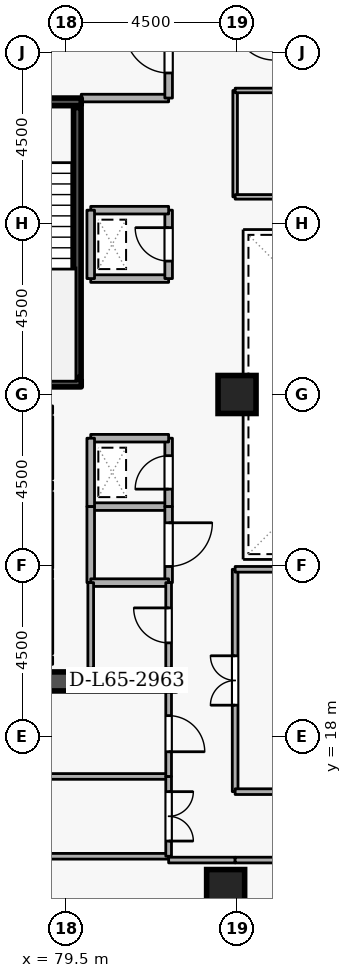
"""IFC4 building model, lengths in metres.
Left out: names, types, materials, properties, quantities, classifications, styles, units other than length and angle.
Written with IfcOpenShell. Run it as: python <this file> out.ifc"""

import sys

from ifc_helpers import new_model, si_unit, direction, frame, frame_2d, origin, origin_2d, place, context, subcontext, project, spatial, rectangle, extrude, element, fill, save


model = new_model("IFC4")
c1 = context("Model", 3, precision=1e-05, world=origin(), true_north=direction((0.0, 1.0)))
c2 = subcontext(c1, "Body", "Model", "MODEL_VIEW")
j1 = project(units=[si_unit("LENGTHUNIT", "METRE"), si_unit("PLANEANGLEUNIT", "RADIAN")], contexts=[c1])
p1 = place(None, origin())
s1 = spatial("IfcSite", under=j1, at=p1, CompositionType="ELEMENT")
p2 = place(p1, origin())
s2 = spatial("IfcBuilding", under=s1, at=p2, CompositionType="ELEMENT")
p3 = place(p2, frame((0.0, 0.0, 243.9)))
s3 = spatial("IfcBuildingStorey", under=s2, at=p3, CompositionType="ELEMENT", Elevation=243.9)
p4 = place(p3, frame((76.6, 19.45, 0.0), z_axis=(0.0, 0.0, 1.0), x_axis=(1.0, 0.0, 0.0)))
e1 = element("IfcWall", 1, at=p4, inside=s3, PredefinedType="SHEAR", context=c2, shape_type="SweptSolid", body=[
    extrude(rectangle(XDim=5.8, YDim=0.5, at=frame_2d((2.9, 0.0))), origin(), (0.0, 0.0, 1.0), 3.6),
])
for number, where, z_axis, x_axis in (
    (2, (83.7, 14.0, 0.0), (0.0, 0.0, 1.0), (1.0, 0.0, 0.0)),
    (3, (84.0, 27.0, 0.0), (0.0, 0.0, 1.0), (1.0, 0.0, 0.0)),
):
    element("IfcColumn", number, at=place(p3, frame(where, z_axis=z_axis, x_axis=x_axis)), inside=s3, PredefinedType="COLUMN", context=c2, shape_type="SweptSolid", body=[
        extrude(rectangle(XDim=1.0, YDim=1.0, at=origin_2d()), origin(), (0.0, 0.0, 1.0), 3.6),
    ])
p5 = place(p3, frame((79.05, 24.78, 0.0), z_axis=(0.0, 0.0, 1.0), x_axis=(0.0, 1.0, 0.0)))
e4 = element("IfcWall", 4, at=p5, inside=s3, PredefinedType="STANDARD", context=c2, shape_type="SweptSolid", body=[
    extrude(rectangle(XDim=1.64, YDim=0.2, at=frame_2d((0.82, 0.0))), origin(), (0.0, 0.0, 1.0), 3.34),
])
p6 = place(p5, frame((0.31, 0.0, 0.0)))
e5 = element("IfcOpeningElement", 5, at=p6, cuts=e4, PredefinedType="OPENING", context=c2, shape_type="SweptSolid", body=[
    extrude(rectangle(XDim=1.02, YDim=2.06, at=frame_2d((0.51, 1.03))), frame((0.0, 0.11, 0.0), z_axis=(0.0, -1.0, 0.0), x_axis=(1.0, 0.0, 0.0)), (0.0, 0.0, 1.0), 0.22),
])
p7 = place(p3, frame((79.05, 22.43, 0.0), z_axis=(0.0, 0.0, 1.0), x_axis=(0.0, 1.0, 0.0)))
e6 = element("IfcWall", 6, at=p7, inside=s3, PredefinedType="STANDARD", context=c2, shape_type="SweptSolid", body=[
    extrude(rectangle(XDim=1.99, YDim=0.2, at=frame_2d((0.995, 0.0))), origin(), (0.0, 0.0, 1.0), 3.34),
])
p8 = place(p7, frame((0.485, 0.0, 0.0)))
e7 = element("IfcOpeningElement", 7, at=p8, cuts=e6, PredefinedType="OPENING", context=c2, shape_type="SweptSolid", body=[
    extrude(rectangle(XDim=1.02, YDim=2.06, at=frame_2d((0.51, 1.03))), frame((0.0, 0.11, 0.0), z_axis=(0.0, -1.0, 0.0), x_axis=(1.0, 0.0, 0.0)), (0.0, 0.0, 1.0), 0.22),
])
p9 = place(p3, frame((79.05, 20.18, 0.0), z_axis=(0.0, 0.0, 1.0), x_axis=(0.0, 1.0, 0.0)))
e8 = element("IfcWall", 8, at=p9, inside=s3, PredefinedType="STANDARD", context=c2, shape_type="SweptSolid", body=[
    extrude(rectangle(XDim=1.94, YDim=0.2, at=frame_2d((0.97, 0.0))), origin(), (0.0, 0.0, 1.0), 3.34),
])
p10 = place(p9, frame((0.46, 0.0, 0.0)))
e9 = element("IfcOpeningElement", 9, at=p10, cuts=e8, PredefinedType="OPENING", context=c2, shape_type="SweptSolid", body=[
    extrude(rectangle(XDim=1.02, YDim=2.06, at=frame_2d((0.51, 1.03))), frame((0.0, 0.11, 0.0), z_axis=(0.0, -1.0, 0.0), x_axis=(1.0, 0.0, 0.0)), (0.0, 0.0, 1.0), 0.22),
])
p11 = place(p3, frame((76.55, 34.7, 0.0), z_axis=(0.0, 0.0, 1.0), x_axis=(1.0, 0.0, 0.0)))
e10 = element("IfcWall", 10, at=p11, inside=s3, PredefinedType="SHEAR", context=c2, shape_type="SweptSolid", body=[
    extrude(rectangle(XDim=3.35, YDim=0.2, at=frame_2d((1.675, 0.0))), origin(), (0.0, 0.0, 1.0), 3.6),
])
p12 = place(p11, frame((1.125, 0.0, 0.0)))
e11 = element("IfcOpeningElement", 11, at=p12, cuts=e10, PredefinedType="OPENING", context=c2, shape_type="SweptSolid", body=[
    extrude(rectangle(XDim=1.1, YDim=2.1, at=frame_2d((0.55, 1.05))), frame((0.0, 0.11, 0.0), z_axis=(0.0, -1.0, 0.0), x_axis=(1.0, 0.0, 0.0)), (0.0, 0.0, 1.0), 0.22),
])
p13 = place(p3, frame((79.9, 27.3, 0.0), z_axis=(0.0, 0.0, 1.0), x_axis=(-1.0, 0.0, 0.0)))
e12 = element("IfcWall", 12, at=p13, inside=s3, PredefinedType="SHEAR", context=c2, shape_type="SweptSolid", body=[
    extrude(rectangle(XDim=3.35, YDim=0.2, at=frame_2d((1.675, 0.0))), origin(), (0.0, 0.0, 1.0), 3.6),
])
p14 = place(p3, frame((79.797, 27.45, 0.0), z_axis=(0.0, 0.0, 1.0), x_axis=(0.0, 1.0, 0.0)))
e13 = element("IfcWall", 13, at=p14, inside=s3, PredefinedType="SHEAR", context=c2, shape_type="SweptSolid", body=[
    extrude(rectangle(XDim=7.1, YDim=0.2, at=frame_2d((3.55, 0.0))), origin(), (0.0, 0.0, 1.0), 3.6),
])
p15 = place(p3, frame((79.9, 34.8, 0.0), z_axis=(0.0, 0.0, 1.0), x_axis=(1.0, 0.0, 0.0)))
e14 = element("IfcWall", 14, at=p15, inside=s3, PredefinedType="STANDARD", context=c2, shape_type="SweptSolid", body=[
    extrude(rectangle(XDim=2.3, YDim=0.2, at=frame_2d((1.15, 0.0))), origin(), (0.0, 0.0, 1.0), 2.545),
])
p16 = place(p3, frame((82.2, 34.8, 0.0), z_axis=(0.0, 0.0, 1.0), x_axis=(0.0, 1.0, 0.0)))
e15 = element("IfcWall", 15, at=p16, inside=s3, PredefinedType="STANDARD", context=c2, shape_type="SweptSolid", body=[
    extrude(rectangle(XDim=2.5, YDim=0.2, at=frame_2d((1.25, 0.0))), origin(), (0.0, 0.0, 1.0), 3.34),
])
p17 = place(p16, frame((0.66, 0.0, 0.0)))
e16 = element("IfcOpeningElement", 16, at=p17, cuts=e15, PredefinedType="OPENING", context=c2, shape_type="SweptSolid", body=[
    extrude(rectangle(XDim=1.15, YDim=2.1, at=frame_2d((0.575, 1.05))), frame((0.0, 0.11, 0.0), z_axis=(0.0, -1.0, 0.0), x_axis=(1.0, 0.0, 0.0)), (0.0, 0.0, 1.0), 0.22),
])
p18 = place(p3, frame((80.15, 24.05, 0.0), z_axis=(0.0, 0.0, 1.0), x_axis=(1.0, 0.0, 0.0)))
e17 = element("IfcWall", 17, at=p18, inside=s3, PredefinedType="STANDARD", context=c2, shape_type="SweptSolid", body=[
    extrude(rectangle(XDim=2.05, YDim=0.2, at=frame_2d((1.025, 0.0))), origin(), (0.0, 0.0, 1.0), 3.34),
])
p19 = place(p3, frame((82.2, 24.05, 0.0), z_axis=(0.0, 0.0, 1.0), x_axis=(0.0, 1.0, 0.0)))
e18 = element("IfcWall", 18, at=p19, inside=s3, PredefinedType="STANDARD", context=c2, shape_type="SweptSolid", body=[
    extrude(rectangle(XDim=1.8, YDim=0.2, at=frame_2d((0.9, 0.0))), origin(), (0.0, 0.0, 1.0), 3.34),
])
p20 = place(p19, frame((0.46, 0.0, 0.0)))
e19 = element("IfcOpeningElement", 19, at=p20, cuts=e18, PredefinedType="OPENING", context=c2, shape_type="SweptSolid", body=[
    extrude(rectangle(XDim=0.88, YDim=2.04, at=frame_2d((0.44, 1.02))), frame((0.0, 0.11, 0.0), z_axis=(0.0, -1.0, 0.0), x_axis=(1.0, 0.0, 0.0)), (0.0, 0.0, 1.0), 0.22),
])
p21 = place(p3, frame((82.2, 25.85, 0.0), z_axis=(0.0, 0.0, 1.0), x_axis=(-1.0, 0.0, 0.0)))
e20 = element("IfcWall", 20, at=p21, inside=s3, PredefinedType="STANDARD", context=c2, shape_type="SweptSolid", body=[
    extrude(rectangle(XDim=2.05, YDim=0.2, at=frame_2d((1.025, 0.0))), origin(), (0.0, 0.0, 1.0), 3.34),
])
p22 = place(p3, frame((80.15, 25.85, 0.0), z_axis=(0.0, 0.0, 1.0), x_axis=(0.0, -1.0, 0.0)))
e21 = element("IfcWall", 21, at=p22, inside=s3, PredefinedType="STANDARD", context=c2, shape_type="SweptSolid", body=[
    extrude(rectangle(XDim=1.8, YDim=0.2, at=frame_2d((0.9, 0.0))), origin(), (0.0, 0.0, 1.0), 3.34),
])
p23 = place(p3, frame((80.15, 30.05, 0.0), z_axis=(0.0, 0.0, 1.0), x_axis=(1.0, 0.0, 0.0)))
e22 = element("IfcWall", 22, at=p23, inside=s3, PredefinedType="STANDARD", context=c2, shape_type="SweptSolid", body=[
    extrude(rectangle(XDim=2.05, YDim=0.2, at=frame_2d((1.025, 0.0))), origin(), (0.0, 0.0, 1.0), 3.34),
])
p24 = place(p3, frame((82.2, 30.05, 0.0), z_axis=(0.0, 0.0, 1.0), x_axis=(0.0, 1.0, 0.0)))
e23 = element("IfcWall", 23, at=p24, inside=s3, PredefinedType="STANDARD", context=c2, shape_type="SweptSolid", body=[
    extrude(rectangle(XDim=1.8, YDim=0.2, at=frame_2d((0.9, 0.0))), origin(), (0.0, 0.0, 1.0), 3.34),
])
p25 = place(p24, frame((0.46, 0.0, 0.0)))
e24 = element("IfcOpeningElement", 24, at=p25, cuts=e23, PredefinedType="OPENING", context=c2, shape_type="SweptSolid", body=[
    extrude(rectangle(XDim=0.88, YDim=2.04, at=frame_2d((0.44, 1.02))), frame((0.0, 0.11, 0.0), z_axis=(0.0, -1.0, 0.0), x_axis=(1.0, 0.0, 0.0)), (0.0, 0.0, 1.0), 0.22),
])
p26 = place(p3, frame((82.2, 31.85, 0.0), z_axis=(0.0, 0.0, 1.0), x_axis=(-1.0, 0.0, 0.0)))
e25 = element("IfcWall", 25, at=p26, inside=s3, PredefinedType="STANDARD", context=c2, shape_type="SweptSolid", body=[
    extrude(rectangle(XDim=2.05, YDim=0.2, at=frame_2d((1.025, 0.0))), origin(), (0.0, 0.0, 1.0), 3.34),
])
p27 = place(p3, frame((80.15, 31.85, 0.0), z_axis=(0.0, 0.0, 1.0), x_axis=(0.0, -1.0, 0.0)))
e26 = element("IfcWall", 26, at=p27, inside=s3, PredefinedType="STANDARD", context=c2, shape_type="SweptSolid", body=[
    extrude(rectangle(XDim=1.8, YDim=0.2, at=frame_2d((0.9, 0.0))), origin(), (0.0, 0.0, 1.0), 3.34),
])
p28 = place(p3, frame((80.15, 22.05, 0.0), z_axis=(0.0, 0.0, 1.0), x_axis=(0.0, 1.0, 0.0)))
e27 = element("IfcWall", 27, at=p28, inside=s3, PredefinedType="STANDARD", context=c2, shape_type="SweptSolid", body=[
    extrude(rectangle(XDim=2.0, YDim=0.2, at=frame_2d((1.0, 0.0))), origin(), (0.0, 0.0, 1.0), 3.34),
])
p29 = place(p3, frame((82.2, 24.05, 0.0), z_axis=(0.0, 0.0, 1.0), x_axis=(0.0, -1.0, 0.0)))
e28 = element("IfcWall", 28, at=p29, inside=s3, PredefinedType="STANDARD", context=c2, shape_type="SweptSolid", body=[
    extrude(rectangle(XDim=2.0, YDim=0.2, at=frame_2d((1.0, 0.0))), origin(), (0.0, 0.0, 1.0), 3.34),
])
p30 = place(p29, frame((0.425, 0.0, 0.0)))
e29 = element("IfcOpeningElement", 29, at=p30, cuts=e28, PredefinedType="OPENING", context=c2, shape_type="SweptSolid", body=[
    extrude(rectangle(XDim=1.15, YDim=2.1, at=frame_2d((0.575, 1.05))), frame((0.0, 0.11, 0.0), z_axis=(0.0, -1.0, 0.0), x_axis=(1.0, 0.0, 0.0)), (0.0, 0.0, 1.0), 0.22),
])
p31 = place(p3, frame((82.2, 22.05, 0.0), z_axis=(0.0, 0.0, 1.0), x_axis=(-1.0, 0.0, 0.0)))
e30 = element("IfcWall", 30, at=p31, inside=s3, PredefinedType="STANDARD", context=c2, shape_type="SweptSolid", body=[
    extrude(rectangle(XDim=2.05, YDim=0.2, at=frame_2d((1.025, 0.0))), origin(), (0.0, 0.0, 1.0), 3.34),
])
p32 = place(p3, frame((82.2, 19.8, 0.0), z_axis=(0.0, 0.0, 1.0), x_axis=(0.0, 1.0, 0.0)))
e31 = element("IfcWall", 31, at=p32, inside=s3, PredefinedType="PARTITIONING", context=c2, shape_type="SweptSolid", body=[
    extrude(rectangle(XDim=2.25, YDim=0.15, at=frame_2d((1.125, 0.0))), origin(), (0.0, 0.0, 1.0), 3.34),
])
p33 = place(p32, frame((0.665, 0.0, 0.0)))
e32 = element("IfcOpeningElement", 32, at=p33, cuts=e31, PredefinedType="OPENING", context=c2, shape_type="SweptSolid", body=[
    extrude(rectangle(XDim=0.92, YDim=2.08, at=frame_2d((0.46, 1.04))), frame((0.0, 0.085, 0.0), z_axis=(0.0, -1.0, 0.0), x_axis=(1.0, 0.0, 0.0)), (0.0, 0.0, 1.0), 0.17),
])
p34 = place(p3, frame((80.15, 22.05, 0.0), z_axis=(0.0, 0.0, 1.0), x_axis=(0.0, -1.0, 0.0)))
e33 = element("IfcWall", 33, at=p34, inside=s3, PredefinedType="PARTITIONING", context=c2, shape_type="SweptSolid", body=[
    extrude(rectangle(XDim=2.25, YDim=0.15, at=frame_2d((1.125, 0.0))), origin(), (0.0, 0.0, 1.0), 3.34),
])
for number, where, z_axis, x_axis in (
    (34, (82.2, 14.85, 0.0), (0.0, 0.0, 1.0), (-1.0, 0.0, 0.0)),
    (35, (70.78, 16.95, 0.0), (0.0, 0.0, 1.0), (1.0, 0.0, 0.0)),
):
    element("IfcWall", number, at=place(p3, frame(where, z_axis=z_axis, x_axis=x_axis)), inside=s3, PredefinedType="PARTITIONING", context=c2, shape_type="SweptSolid", body=[
        extrude(rectangle(XDim=11.42, YDim=0.15, at=frame_2d((5.71, 0.0))), origin(), (0.0, 0.0, 1.0), 3.34),
    ])
p35 = place(p3, frame((82.2, 16.95, 0.0), z_axis=(0.0, 0.0, 1.0), x_axis=(0.0, -1.0, 0.0)))
e36 = element("IfcWall", 36, at=p35, inside=s3, PredefinedType="PARTITIONING", context=c2, shape_type="SweptSolid", body=[
    extrude(rectangle(XDim=2.1, YDim=0.15, at=frame_2d((1.05, 0.0))), origin(), (0.0, 0.0, 1.0), 3.34),
])
p36 = place(p35, frame((0.4, 0.0, 0.0)))
e37 = element("IfcOpeningElement", 37, at=p36, cuts=e36, PredefinedType="OPENING", context=c2, shape_type="SweptSolid", body=[
    extrude(rectangle(XDim=1.3, YDim=2.12, at=frame_2d((0.65, 1.06))), frame((0.0, 0.085, 0.0), z_axis=(0.0, -1.0, 0.0), x_axis=(1.0, 0.0, 0.0)), (0.0, 0.0, 1.0), 0.17),
])
p37 = place(p3, frame((82.2, 19.2, 0.0), z_axis=(0.0, 0.0, 1.0), x_axis=(0.0, -1.0, 0.0)))
e38 = element("IfcWall", 38, at=p37, inside=s3, PredefinedType="PARTITIONING", context=c2, shape_type="SweptSolid", body=[
    extrude(rectangle(XDim=2.25, YDim=0.15, at=frame_2d((1.125, 0.0))), origin(), (0.0, 0.0, 1.0), 3.34),
])
p38 = place(p37, frame((0.65, 0.0, 0.0)))
e39 = element("IfcOpeningElement", 39, at=p38, cuts=e38, PredefinedType="OPENING", context=c2, shape_type="SweptSolid", body=[
    extrude(rectangle(XDim=0.95, YDim=2.1, at=frame_2d((0.475, 1.05))), frame((0.0, 0.085, 0.0), z_axis=(0.0, -1.0, 0.0), x_axis=(1.0, 0.0, 0.0)), (0.0, 0.0, 1.0), 0.17),
])
p39 = place(p3, frame((82.2, 14.75, 0.0), z_axis=(0.0, 0.0, 1.0), x_axis=(1.0, 0.0, 0.0)))
e40 = element("IfcWall", 40, at=p39, inside=s3, PredefinedType="PARTITIONING", context=c2, shape_type="SweptSolid", body=[
    extrude(rectangle(XDim=1.75, YDim=0.15, at=frame_2d((0.875, 0.0))), origin(), (0.0, 0.0, 1.0), 3.34),
])
p40 = place(p3, frame((83.95, 14.75, 0.0), z_axis=(0.0, 0.0, 1.0), x_axis=(1.0, 0.0, 0.0)))
e41 = element("IfcWall", 41, at=p40, inside=s3, PredefinedType="PARTITIONING", context=c2, shape_type="SweptSolid", body=[
    extrude(rectangle(XDim=3.35, YDim=0.15, at=frame_2d((1.675, 0.0))), origin(), (0.0, 0.0, 1.0), 3.34),
])
p41 = place(p40, frame((1.025, 0.0, 0.0)))
e42 = element("IfcOpeningElement", 42, at=p41, cuts=e41, PredefinedType="OPENING", context=c2, shape_type="SweptSolid", body=[
    extrude(rectangle(XDim=1.3, YDim=2.12, at=frame_2d((0.65, 1.06))), frame((0.0, 0.085, 0.0), z_axis=(0.0, -1.0, 0.0), x_axis=(1.0, 0.0, 0.0)), (0.0, 0.0, 1.0), 0.17),
])
p42 = place(p3, frame((83.95, 16.55, 0.0), z_axis=(0.0, 0.0, 1.0), x_axis=(0.0, 1.0, 0.0)))
e43 = element("IfcWall", 43, at=p42, inside=s3, PredefinedType="PARTITIONING", context=c2, shape_type="SweptSolid", body=[
    extrude(rectangle(XDim=5.85, YDim=0.15, at=frame_2d((2.925, 0.0))), origin(), (0.0, 0.0, 1.0), 3.34),
])
p43 = place(p42, frame((2.275, 0.0, 0.0)))
e44 = element("IfcOpeningElement", 44, at=p43, cuts=e43, PredefinedType="OPENING", context=c2, shape_type="SweptSolid", body=[
    extrude(rectangle(XDim=1.3, YDim=2.12, at=frame_2d((0.65, 1.06))), frame((0.0, 0.085, 0.0), z_axis=(0.0, -1.0, 0.0), x_axis=(1.0, 0.0, 0.0)), (0.0, 0.0, 1.0), 0.17),
])
for number, where, z_axis, x_axis in (
    (45, (83.95, 22.4, 0.0), (0.0, 0.0, 1.0), (1.0, 0.0, 0.0)),
    (46, (87.3, 16.55, 0.0), (0.0, 0.0, 1.0), (-1.0, 0.0, 0.0)),
):
    element("IfcWall", number, at=place(p3, frame(where, z_axis=z_axis, x_axis=x_axis)), inside=s3, PredefinedType="PARTITIONING", context=c2, shape_type="SweptSolid", body=[
        extrude(rectangle(XDim=3.35, YDim=0.15, at=frame_2d((1.675, 0.0))), origin(), (0.0, 0.0, 1.0), 3.34),
    ])
p44 = place(p3, frame((83.95, 32.2, 0.0), z_axis=(0.0, 0.0, 1.0), x_axis=(0.0, 1.0, 0.0)))
e47 = element("IfcWall", 47, at=p44, inside=s3, PredefinedType="PARTITIONING", context=c2, shape_type="SweptSolid", body=[
    extrude(rectangle(XDim=2.8, YDim=0.12, at=frame_2d((1.4, 0.0))), origin(), (0.0, 0.0, 1.0), 3.34),
])
p45 = place(p3, frame((83.95, 35.0, 0.0), z_axis=(0.0, 0.0, 1.0), x_axis=(1.0, 0.0, 0.0)))
e48 = element("IfcWall", 48, at=p45, inside=s3, PredefinedType="PARTITIONING", context=c2, shape_type="SweptSolid", body=[
    extrude(rectangle(XDim=4.55, YDim=0.12, at=frame_2d((2.275, 0.0))), origin(), (0.0, 0.0, 1.0), 3.34),
])
p46 = place(p45, frame((1.8, 0.0, 0.0)))
e49 = element("IfcOpeningElement", 49, at=p46, cuts=e48, PredefinedType="OPENING", context=c2, shape_type="SweptSolid", body=[
    extrude(rectangle(XDim=0.95, YDim=2.1, at=frame_2d((0.475, 1.05))), frame((0.0, 0.07, 0.0), z_axis=(0.0, -1.0, 0.0), x_axis=(1.0, 0.0, 0.0)), (0.0, 0.0, 1.0), 0.14),
])
p47 = place(p3, frame((88.5, 32.2, 0.0), z_axis=(0.0, 0.0, 1.0), x_axis=(-1.0, 0.0, 0.0)))
e50 = element("IfcWall", 50, at=p47, inside=s3, PredefinedType="PARTITIONING", context=c2, shape_type="SweptSolid", body=[
    extrude(rectangle(XDim=4.55, YDim=0.12, at=frame_2d((2.275, 0.0))), origin(), (0.0, 0.0, 1.0), 3.34),
])
p48 = place(p17, origin())
e51 = element("IfcDoor", 51, at=p48, inside=s3, OperationType="SINGLE_SWING_RIGHT", PredefinedType="DOOR", context=c2, shape_type="SweptSolid", body=[
    extrude(rectangle(XDim=1.15, YDim=2.1, at=frame_2d((0.575, 1.05))), frame((0.0, 0.025, 0.0), z_axis=(0.0, -1.0, 0.0), x_axis=(1.0, 0.0, 0.0)), (0.0, 0.0, 1.0), 0.05),
])
fill(e16, e51)
p49 = place(p20, origin())
e52 = element("IfcDoor", 52, at=p49, inside=s3, OperationType="SINGLE_SWING_LEFT", PredefinedType="DOOR", context=c2, shape_type="SweptSolid", body=[
    extrude(rectangle(XDim=0.88, YDim=2.04, at=frame_2d((0.44, 1.02))), frame((0.0, 0.025, 0.0), z_axis=(0.0, -1.0, 0.0), x_axis=(1.0, 0.0, 0.0)), (0.0, 0.0, 1.0), 0.05),
])
fill(e19, e52)
p50 = place(p25, origin())
e53 = element("IfcDoor", 53, at=p50, inside=s3, OperationType="SINGLE_SWING_RIGHT", PredefinedType="DOOR", context=c2, shape_type="SweptSolid", body=[
    extrude(rectangle(XDim=0.88, YDim=2.04, at=frame_2d((0.44, 1.02))), frame((0.0, 0.025, 0.0), z_axis=(0.0, -1.0, 0.0), x_axis=(1.0, 0.0, 0.0)), (0.0, 0.0, 1.0), 0.05),
])
fill(e24, e53)
p51 = place(p33, origin())
e54 = element("IfcDoor", 54, at=p51, inside=s3, OperationType="SINGLE_SWING_RIGHT", PredefinedType="DOOR", context=c2, shape_type="SweptSolid", body=[
    extrude(rectangle(XDim=0.92, YDim=2.08, at=frame_2d((0.46, 1.04))), frame((0.0, 0.025, 0.0), z_axis=(0.0, -1.0, 0.0), x_axis=(1.0, 0.0, 0.0)), (0.0, 0.0, 1.0), 0.05),
])
fill(e32, e54)
p52 = place(p30, origin())
e55 = element("IfcDoor", 55, at=p52, inside=s3, OperationType="SINGLE_SWING_LEFT", PredefinedType="DOOR", context=c2, shape_type="SweptSolid", body=[
    extrude(rectangle(XDim=1.15, YDim=2.1, at=frame_2d((0.575, 1.05))), frame((0.0, 0.025, 0.0), z_axis=(0.0, -1.0, 0.0), x_axis=(1.0, 0.0, 0.0)), (0.0, 0.0, 1.0), 0.05),
])
fill(e29, e55)
p53 = place(p36, origin())
e56 = element("IfcDoor", 56, at=p53, inside=s3, OperationType="DOUBLE_DOOR_SINGLE_SWING", PredefinedType="DOOR", context=c2, shape_type="SweptSolid", body=[
    extrude(rectangle(XDim=1.3, YDim=2.12, at=frame_2d((0.65, 1.06))), frame((0.0, 0.025, 0.0), z_axis=(0.0, -1.0, 0.0), x_axis=(1.0, 0.0, 0.0)), (0.0, 0.0, 1.0), 0.05),
])
fill(e37, e56)
p54 = place(p38, origin())
e57 = element("IfcDoor", 57, at=p54, inside=s3, OperationType="SINGLE_SWING_RIGHT", PredefinedType="DOOR", context=c2, shape_type="SweptSolid", body=[
    extrude(rectangle(XDim=0.95, YDim=2.1, at=frame_2d((0.475, 1.05))), frame((0.0, 0.025, 0.0), z_axis=(0.0, -1.0, 0.0), x_axis=(1.0, 0.0, 0.0)), (0.0, 0.0, 1.0), 0.05),
])
fill(e39, e57)
p55 = place(p43, origin())
e58 = element("IfcDoor", 58, at=p55, inside=s3, OperationType="DOUBLE_DOOR_SINGLE_SWING", PredefinedType="DOOR", context=c2, shape_type="SweptSolid", body=[
    extrude(rectangle(XDim=1.3, YDim=2.12, at=frame_2d((0.65, 1.06))), frame((0.0, 0.025, 0.0), z_axis=(0.0, -1.0, 0.0), x_axis=(1.0, 0.0, 0.0)), (0.0, 0.0, 1.0), 0.05),
])
fill(e44, e58)
save(model, sys.argv[1])
